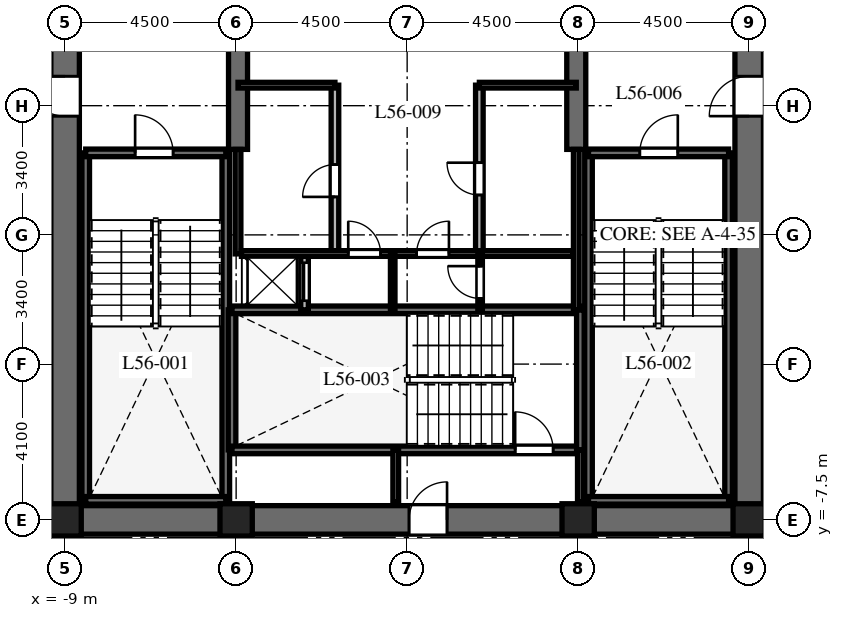
"""IFC4 building model, lengths in metres.
Left out: names, types, materials, properties, quantities, classifications, styles, units other than length and angle.
Written with IfcOpenShell. Run it as: python <this file> out.ifc"""

import sys

from ifc_helpers import new_model, si_unit, direction, frame, frame_2d, origin, origin_2d, place, context, subcontext, project, spatial, rectangle, extrude, element, fill, save


model = new_model("IFC4")
c1 = context("Model", 3, precision=1e-05, world=origin(), true_north=direction((0.0, 1.0)))
c2 = subcontext(c1, "Body", "Model", "MODEL_VIEW")
j1 = project(units=[si_unit("LENGTHUNIT", "METRE"), si_unit("PLANEANGLEUNIT", "RADIAN")], contexts=[c1])
p1 = place(None, origin())
s1 = spatial("IfcSite", under=j1, at=p1, CompositionType="ELEMENT")
p2 = place(p1, origin())
s2 = spatial("IfcBuilding", under=s1, at=p2, CompositionType="ELEMENT")
p3 = place(p2, frame((0.0, 0.0, 225.5)))
s3 = spatial("IfcBuildingStorey", under=s2, at=p3, CompositionType="ELEMENT", Elevation=225.5)
p4 = place(p3, frame((-9.375, -7.5, 0.0), z_axis=(0.0, 0.0, 1.0), x_axis=(1.0, 0.0, 0.0)))
e1 = element("IfcWall", 1, at=p4, inside=s3, PredefinedType="SHEAR", context=c2, shape_type="SweptSolid", body=[
    extrude(rectangle(XDim=18.75, YDim=0.75, at=frame_2d((9.375, 0.0))), origin(), (0.0, 0.0, 1.0), 3.8),
])
p5 = place(p4, frame((9.425, 0.0, 0.0)))
e2 = element("IfcOpeningElement", 2, at=p5, cuts=e1, PredefinedType="OPENING", context=c2, shape_type="SweptSolid", body=[
    extrude(rectangle(XDim=1.0, YDim=2.15, at=frame_2d((0.5, 1.075))), frame((0.0, 0.385, 0.0), z_axis=(0.0, -1.0, 0.0), x_axis=(1.0, 0.0, 0.0)), (0.0, 0.0, 1.0), 0.77),
])
p6 = place(p3, frame((-9.0, -7.125, 0.0), z_axis=(0.0, 0.0, 1.0), x_axis=(0.0, 1.0, 0.0)))
e3 = element("IfcWall", 3, at=p6, inside=s3, PredefinedType="SHEAR", context=c2, shape_type="SweptSolid", body=[
    extrude(rectangle(XDim=14.25, YDim=0.75, at=frame_2d((7.125, 0.0))), origin(), (0.0, 0.0, 1.0), 3.8),
])
p7 = place(p6, frame((10.25, 0.0, 0.0)))
e4 = element("IfcOpeningElement", 4, at=p7, cuts=e3, PredefinedType="OPENING", context=c2, shape_type="SweptSolid", body=[
    extrude(rectangle(XDim=1.05, YDim=2.15, at=frame_2d((0.525, 1.075))), frame((0.0, 0.385, 0.0), z_axis=(0.0, -1.0, 0.0), x_axis=(1.0, 0.0, 0.0)), (0.0, 0.0, 1.0), 0.77),
])
p8 = place(p3, frame((9.0, -7.125, 0.0), z_axis=(0.0, 0.0, 1.0), x_axis=(0.0, 1.0, 0.0)))
e5 = element("IfcWall", 5, at=p8, inside=s3, PredefinedType="SHEAR", context=c2, shape_type="SweptSolid", body=[
    extrude(rectangle(XDim=14.25, YDim=0.75, at=frame_2d((7.125, 0.0))), origin(), (0.0, 0.0, 1.0), 3.8),
])
p9 = place(p8, frame((10.25, 0.0, 0.0)))
e6 = element("IfcOpeningElement", 6, at=p9, cuts=e5, PredefinedType="OPENING", context=c2, shape_type="SweptSolid", body=[
    extrude(rectangle(XDim=1.05, YDim=2.15, at=frame_2d((0.525, 1.075))), frame((0.0, 0.385, 0.0), z_axis=(0.0, -1.0, 0.0), x_axis=(1.0, 0.0, 0.0)), (0.0, 0.0, 1.0), 0.77),
])
for number, where, z_axis, x_axis in (
    (7, (-4.45, 2.25, 0.0), (0.0, 0.0, 1.0), (0.0, 1.0, 0.0)),
    (8, (4.45, 2.25, 0.0), (0.0, 0.0, 1.0), (0.0, 1.0, 0.0)),
):
    element("IfcWall", number, at=place(p3, frame(where, z_axis=z_axis, x_axis=x_axis)), inside=s3, PredefinedType="SHEAR", context=c2, shape_type="SweptSolid", body=[
        extrude(rectangle(XDim=4.875, YDim=0.5, at=frame_2d((2.438, 0.0))), origin(), (0.0, 0.0, 1.0), 3.8),
    ])
for number, where, z_axis, x_axis in (
    (9, (-8.458, -6.985, 0.0), (0.0, 0.0, 1.0), (0.0, 1.0, 0.0)),
    (10, (-4.772, -6.985, 0.0), (0.0, 0.0, 1.0), (0.0, 1.0, 0.0)),
):
    element("IfcWall", number, at=place(p3, frame(where, z_axis=z_axis, x_axis=x_axis)), inside=s3, PredefinedType="SHEAR", context=c2, shape_type="SweptSolid", body=[
        extrude(rectangle(XDim=9.143, YDim=0.2, at=frame_2d((4.572, 0.0))), origin(), (0.0, 0.0, 1.0), 3.8),
    ])
p10 = place(p3, frame((-8.458, -6.985, 0.0), z_axis=(0.0, 0.0, 1.0), x_axis=(1.0, 0.0, 0.0)))
e11 = element("IfcWall", 11, at=p10, inside=s3, PredefinedType="SHEAR", context=c2, shape_type="SweptSolid", body=[
    extrude(rectangle(XDim=3.686, YDim=0.2, at=frame_2d((1.843, 0.0))), origin(), (0.0, 0.0, 1.0), 3.8),
])
p11 = place(p3, frame((-8.458, 2.158, 0.0), z_axis=(0.0, 0.0, 1.0), x_axis=(1.0, 0.0, 0.0)))
e12 = element("IfcWall", 12, at=p11, inside=s3, PredefinedType="SHEAR", context=c2, shape_type="SweptSolid", body=[
    extrude(rectangle(XDim=3.686, YDim=0.2, at=frame_2d((1.843, 0.0))), origin(), (0.0, 0.0, 1.0), 3.8),
])
p12 = place(p11, frame((1.3, 0.0, 0.0)))
e13 = element("IfcOpeningElement", 13, at=p12, cuts=e12, PredefinedType="OPENING", context=c2, shape_type="SweptSolid", body=[
    extrude(rectangle(XDim=1.0, YDim=2.15, at=frame_2d((0.5, 1.075))), frame((0.0, 0.11, 0.0), z_axis=(0.0, -1.0, 0.0), x_axis=(1.0, 0.0, 0.0)), (0.0, 0.0, 1.0), 0.22),
])
for number, where, z_axis, x_axis in (
    (14, (4.772, -6.985, 0.0), (0.0, 0.0, 1.0), (0.0, 1.0, 0.0)),
    (15, (8.458, -6.985, 0.0), (0.0, 0.0, 1.0), (0.0, 1.0, 0.0)),
):
    element("IfcWall", number, at=place(p3, frame(where, z_axis=z_axis, x_axis=x_axis)), inside=s3, PredefinedType="SHEAR", context=c2, shape_type="SweptSolid", body=[
        extrude(rectangle(XDim=9.143, YDim=0.2, at=frame_2d((4.572, 0.0))), origin(), (0.0, 0.0, 1.0), 3.8),
    ])
p13 = place(p3, frame((4.772, -6.985, 0.0), z_axis=(0.0, 0.0, 1.0), x_axis=(1.0, 0.0, 0.0)))
e16 = element("IfcWall", 16, at=p13, inside=s3, PredefinedType="SHEAR", context=c2, shape_type="SweptSolid", body=[
    extrude(rectangle(XDim=3.686, YDim=0.2, at=frame_2d((1.843, 0.0))), origin(), (0.0, 0.0, 1.0), 3.8),
])
p14 = place(p3, frame((4.772, 2.158, 0.0), z_axis=(0.0, 0.0, 1.0), x_axis=(1.0, 0.0, 0.0)))
e17 = element("IfcWall", 17, at=p14, inside=s3, PredefinedType="SHEAR", context=c2, shape_type="SweptSolid", body=[
    extrude(rectangle(XDim=3.686, YDim=0.2, at=frame_2d((1.843, 0.0))), origin(), (0.0, 0.0, 1.0), 3.8),
])
p15 = place(p14, frame((1.35, 0.0, 0.0)))
e18 = element("IfcOpeningElement", 18, at=p15, cuts=e17, PredefinedType="OPENING", context=c2, shape_type="SweptSolid", body=[
    extrude(rectangle(XDim=1.0, YDim=2.15, at=frame_2d((0.5, 1.075))), frame((0.0, 0.11, 0.0), z_axis=(0.0, -1.0, 0.0), x_axis=(1.0, 0.0, 0.0)), (0.0, 0.0, 1.0), 0.22),
])
p16 = place(p3, frame((-4.608, -5.658, 0.0), z_axis=(0.0, 0.0, 1.0), x_axis=(0.0, 1.0, 0.0)))
e19 = element("IfcWall", 19, at=p16, inside=s3, PredefinedType="SHEAR", context=c2, shape_type="SweptSolid", body=[
    extrude(rectangle(XDim=3.686, YDim=0.2, at=frame_2d((1.843, 0.0))), origin(), (0.0, 0.0, 1.0), 3.8),
])
p17 = place(p3, frame((-4.608, -5.658, 0.0), z_axis=(0.0, 0.0, 1.0), x_axis=(1.0, 0.0, 0.0)))
e20 = element("IfcWall", 20, at=p17, inside=s3, PredefinedType="SHEAR", context=c2, shape_type="SweptSolid", body=[
    extrude(rectangle(XDim=9.166, YDim=0.2, at=frame_2d((4.583, 0.0))), origin(), (0.0, 0.0, 1.0), 3.8),
])
p18 = place(p17, frame((7.45, 0.0, 0.0)))
e21 = element("IfcOpeningElement", 21, at=p18, cuts=e20, PredefinedType="OPENING", context=c2, shape_type="SweptSolid", body=[
    extrude(rectangle(XDim=1.0, YDim=2.15, at=frame_2d((0.5, 1.075))), frame((0.0, 0.11, 0.0), z_axis=(0.0, -1.0, 0.0), x_axis=(1.0, 0.0, 0.0)), (0.0, 0.0, 1.0), 0.22),
])
p19 = place(p3, frame((-4.608, -1.972, 0.0), z_axis=(0.0, 0.0, 1.0), x_axis=(1.0, 0.0, 0.0)))
e22 = element("IfcWall", 22, at=p19, inside=s3, PredefinedType="SHEAR", context=c2, shape_type="SweptSolid", body=[
    extrude(rectangle(XDim=9.166, YDim=0.2, at=frame_2d((4.583, 0.0))), origin(), (0.0, 0.0, 1.0), 3.8),
])
p20 = place(p3, frame((4.558, -5.658, 0.0), z_axis=(0.0, 0.0, 1.0), x_axis=(0.0, 1.0, 0.0)))
e23 = element("IfcWall", 23, at=p20, inside=s3, PredefinedType="SHEAR", context=c2, shape_type="SweptSolid", body=[
    extrude(rectangle(XDim=3.686, YDim=0.2, at=frame_2d((1.843, 0.0))), origin(), (0.0, 0.0, 1.0), 3.8),
])
for number, where, z_axis, x_axis in (
    (24, (-9.0, -7.5, 0.0), (0.0, 0.0, 1.0), (1.0, 0.0, 0.0)),
    (25, (-4.5, -7.5, 0.0), (0.0, 0.0, 1.0), (1.0, 0.0, 0.0)),
    (26, (4.5, -7.5, 0.0), (0.0, 0.0, 1.0), (1.0, 0.0, 0.0)),
    (27, (9.0, -7.5, 0.0), (0.0, 0.0, 1.0), (1.0, 0.0, 0.0)),
):
    element("IfcColumn", number, at=place(p3, frame(where, z_axis=z_axis, x_axis=x_axis)), inside=s3, PredefinedType="COLUMN", context=c2, shape_type="SweptSolid", body=[
        extrude(rectangle(XDim=0.85, YDim=0.85, at=origin_2d()), origin(), (0.0, 0.0, 1.0), 3.8),
    ])
for number, where, z_axis, x_axis in (
    (28, (-0.3, -7.02, 0.0), (0.0, 0.0, 1.0), (0.0, 1.0, 0.0)),
    (29, (4.558, -7.02, 0.0), (0.0, 0.0, 1.0), (0.0, 1.0, 0.0)),
):
    element("IfcWall", number, at=place(p3, frame(where, z_axis=z_axis, x_axis=x_axis)), inside=s3, PredefinedType="PARTITIONING", context=c2, shape_type="SweptSolid", body=[
        extrude(rectangle(XDim=1.362, YDim=0.15, at=frame_2d((0.681, 0.0))), origin(), (0.0, 0.0, 1.0), 3.5),
    ])
p21 = place(p3, frame((-2.7, -1.972, 0.0), z_axis=(0.0, 0.0, 1.0), x_axis=(0.0, 1.0, 0.0)))
e30 = element("IfcWall", 30, at=p21, inside=s3, PredefinedType="PARTITIONING", context=c2, shape_type="SweptSolid", body=[
    extrude(rectangle(XDim=1.472, YDim=0.2, at=frame_2d((0.736, 0.0))), origin(), (0.0, 0.0, 1.0), 3.5),
])
p22 = place(p21, frame((0.24, 0.0, 0.0)))
e31 = element("IfcOpeningElement", 31, at=p22, cuts=e30, PredefinedType="OPENING", context=c2, shape_type="SweptSolid", body=[
    extrude(rectangle(XDim=1.0, YDim=2.2, at=frame_2d((0.5, 1.1))), frame((0.0, 0.11, 0.0), z_axis=(0.0, -1.0, 0.0), x_axis=(1.0, 0.0, 0.0)), (0.0, 0.0, 1.0), 0.22),
])
p23 = place(p3, frame((-4.45, -0.5, 0.0), z_axis=(0.0, 0.0, 1.0), x_axis=(0.0, 1.0, 0.0)))
e32 = element("IfcWall", 32, at=p23, inside=s3, PredefinedType="PARTITIONING", context=c2, shape_type="SweptSolid", body=[
    extrude(rectangle(XDim=2.75, YDim=0.15, at=frame_2d((1.375, 0.0))), origin(), (0.0, 0.0, 1.0), 3.5),
])
p24 = place(p3, frame((4.45, -1.972, 0.0), z_axis=(0.0, 0.0, 1.0), x_axis=(0.0, 1.0, 0.0)))
e33 = element("IfcWall", 33, at=p24, inside=s3, PredefinedType="PARTITIONING", context=c2, shape_type="SweptSolid", body=[
    extrude(rectangle(XDim=4.222, YDim=0.15, at=frame_2d((2.111, 0.0))), origin(), (0.0, 0.0, 1.0), 3.5),
])
p25 = place(p3, frame((-1.9, -0.5, 0.0), z_axis=(0.0, 0.0, 1.0), x_axis=(0.0, 1.0, 0.0)))
e34 = element("IfcWall", 34, at=p25, inside=s3, PredefinedType="PARTITIONING", context=c2, shape_type="SweptSolid", body=[
    extrude(rectangle(XDim=4.44, YDim=0.2, at=frame_2d((2.22, 0.0))), origin(), (0.0, 0.0, 1.0), 3.5),
])
p26 = place(p25, frame((1.5, 0.0, 0.0)))
e35 = element("IfcOpeningElement", 35, at=p26, cuts=e34, PredefinedType="OPENING", context=c2, shape_type="SweptSolid", body=[
    extrude(rectangle(XDim=0.85, YDim=2.03, at=frame_2d((0.425, 1.015))), frame((0.0, 0.11, 0.0), z_axis=(0.0, -1.0, 0.0), x_axis=(1.0, 0.0, 0.0)), (0.0, 0.0, 1.0), 0.22),
])
p27 = place(p3, frame((-4.45, 3.94, 0.0), z_axis=(0.0, 0.0, 1.0), x_axis=(1.0, 0.0, 0.0)))
e36 = element("IfcWall", 36, at=p27, inside=s3, PredefinedType="PARTITIONING", context=c2, shape_type="SweptSolid", body=[
    extrude(rectangle(XDim=2.55, YDim=0.15, at=frame_2d((1.275, 0.0))), origin(), (0.0, 0.0, 1.0), 3.5),
])
p28 = place(p3, frame((1.9, -0.5, 0.0), z_axis=(0.0, 0.0, 1.0), x_axis=(0.0, 1.0, 0.0)))
e37 = element("IfcWall", 37, at=p28, inside=s3, PredefinedType="PARTITIONING", context=c2, shape_type="SweptSolid", body=[
    extrude(rectangle(XDim=4.44, YDim=0.2, at=frame_2d((2.22, 0.0))), origin(), (0.0, 0.0, 1.0), 3.5),
])
p29 = place(p28, frame((1.55, 0.0, 0.0)))
e38 = element("IfcOpeningElement", 38, at=p29, cuts=e37, PredefinedType="OPENING", context=c2, shape_type="SweptSolid", body=[
    extrude(rectangle(XDim=0.85, YDim=2.03, at=frame_2d((0.425, 1.015))), frame((0.0, 0.11, 0.0), z_axis=(0.0, -1.0, 0.0), x_axis=(1.0, 0.0, 0.0)), (0.0, 0.0, 1.0), 0.22),
])
p30 = place(p3, frame((1.9, 3.94, 0.0), z_axis=(0.0, 0.0, 1.0), x_axis=(1.0, 0.0, 0.0)))
e39 = element("IfcWall", 39, at=p30, inside=s3, PredefinedType="PARTITIONING", context=c2, shape_type="SweptSolid", body=[
    extrude(rectangle(XDim=2.55, YDim=0.15, at=frame_2d((1.275, 0.0))), origin(), (0.0, 0.0, 1.0), 3.5),
])
p31 = place(p3, frame((-4.36, -0.49, 0.0), z_axis=(0.0, 0.0, 1.0), x_axis=(1.0, 0.0, 0.0)))
e40 = element("IfcWall", 40, at=p31, inside=s3, PredefinedType="PARTITIONING", context=c2, shape_type="SweptSolid", body=[
    extrude(rectangle(XDim=8.72, YDim=0.15, at=frame_2d((4.36, 0.0))), origin(), (0.0, 0.0, 1.0), 3.5),
])
p32 = place(p31, frame((2.81, 0.0, 0.0)))
e41 = element("IfcOpeningElement", 41, at=p32, cuts=e40, PredefinedType="OPENING", context=c2, shape_type="SweptSolid", body=[
    extrude(rectangle(XDim=0.85, YDim=2.03, at=frame_2d((0.425, 1.015))), frame((0.0, 0.085, 0.0), z_axis=(0.0, -1.0, 0.0), x_axis=(1.0, 0.0, 0.0)), (0.0, 0.0, 1.0), 0.17),
])
p33 = place(p31, frame((4.61, 0.0, 0.0)))
e42 = element("IfcOpeningElement", 42, at=p33, cuts=e40, PredefinedType="OPENING", context=c2, shape_type="SweptSolid", body=[
    extrude(rectangle(XDim=0.85, YDim=2.03, at=frame_2d((0.425, 1.015))), frame((0.0, 0.085, 0.0), z_axis=(0.0, -1.0, 0.0), x_axis=(1.0, 0.0, 0.0)), (0.0, 0.0, 1.0), 0.17),
])
p34 = place(p3, frame((-0.38, -1.972, 0.0), z_axis=(0.0, 0.0, 1.0), x_axis=(0.0, 1.0, 0.0)))
e43 = element("IfcWall", 43, at=p34, inside=s3, PredefinedType="PARTITIONING", context=c2, shape_type="SweptSolid", body=[
    extrude(rectangle(XDim=1.472, YDim=0.12, at=frame_2d((0.736, 0.0))), origin(), (0.0, 0.0, 1.0), 3.5),
])
p35 = place(p3, frame((1.92, -1.972, 0.0), z_axis=(0.0, 0.0, 1.0), x_axis=(0.0, 1.0, 0.0)))
e44 = element("IfcWall", 44, at=p35, inside=s3, PredefinedType="PARTITIONING", context=c2, shape_type="SweptSolid", body=[
    extrude(rectangle(XDim=1.472, YDim=0.12, at=frame_2d((0.736, 0.0))), origin(), (0.0, 0.0, 1.0), 3.5),
])
p36 = place(p35, frame((0.3, 0.0, 0.0)))
e45 = element("IfcOpeningElement", 45, at=p36, cuts=e44, PredefinedType="OPENING", context=c2, shape_type="SweptSolid", body=[
    extrude(rectangle(XDim=0.85, YDim=2.03, at=frame_2d((0.425, 1.015))), frame((0.0, 0.07, 0.0), z_axis=(0.0, -1.0, 0.0), x_axis=(1.0, 0.0, 0.0)), (0.0, 0.0, 1.0), 0.14),
])
p37 = place(p12, origin())
e46 = element("IfcDoor", 46, at=p37, inside=s3, OperationType="SINGLE_SWING_LEFT", PredefinedType="DOOR", context=c2, shape_type="SweptSolid", body=[
    extrude(rectangle(XDim=1.0, YDim=2.15, at=frame_2d((0.5, 1.075))), frame((0.0, 0.025, 0.0), z_axis=(0.0, -1.0, 0.0), x_axis=(1.0, 0.0, 0.0)), (0.0, 0.0, 1.0), 0.05),
])
fill(e13, e46)
p38 = place(p15, origin())
e47 = element("IfcDoor", 47, at=p38, inside=s3, OperationType="SINGLE_SWING_RIGHT", PredefinedType="DOOR", context=c2, shape_type="SweptSolid", body=[
    extrude(rectangle(XDim=1.0, YDim=2.15, at=frame_2d((0.5, 1.075))), frame((0.0, 0.025, 0.0), z_axis=(0.0, -1.0, 0.0), x_axis=(1.0, 0.0, 0.0)), (0.0, 0.0, 1.0), 0.05),
])
fill(e18, e47)
p39 = place(p18, origin())
e48 = element("IfcDoor", 48, at=p39, inside=s3, OperationType="SINGLE_SWING_LEFT", PredefinedType="DOOR", context=c2, shape_type="SweptSolid", body=[
    extrude(rectangle(XDim=1.0, YDim=2.15, at=frame_2d((0.5, 1.075))), frame((0.0, 0.025, 0.0), z_axis=(0.0, -1.0, 0.0), x_axis=(1.0, 0.0, 0.0)), (0.0, 0.0, 1.0), 0.05),
])
fill(e21, e48)
p40 = place(p5, origin())
e49 = element("IfcDoor", 49, at=p40, inside=s3, OperationType="SINGLE_SWING_RIGHT", PredefinedType="DOOR", context=c2, shape_type="SweptSolid", body=[
    extrude(rectangle(XDim=1.0, YDim=2.15, at=frame_2d((0.5, 1.075))), frame((0.0, 0.025, 0.0), z_axis=(0.0, -1.0, 0.0), x_axis=(1.0, 0.0, 0.0)), (0.0, 0.0, 1.0), 0.05),
])
fill(e2, e49)
p41 = place(p7, origin())
e50 = element("IfcDoor", 50, at=p41, inside=s3, OperationType="SINGLE_SWING_RIGHT", PredefinedType="DOOR", context=c2, shape_type="SweptSolid", body=[
    extrude(rectangle(XDim=1.05, YDim=2.15, at=frame_2d((0.525, 1.075))), frame((0.0, 0.025, 0.0), z_axis=(0.0, -1.0, 0.0), x_axis=(1.0, 0.0, 0.0)), (0.0, 0.0, 1.0), 0.05),
])
fill(e4, e50)
p42 = place(p9, origin())
e51 = element("IfcDoor", 51, at=p42, inside=s3, OperationType="SINGLE_SWING_LEFT", PredefinedType="DOOR", context=c2, shape_type="SweptSolid", body=[
    extrude(rectangle(XDim=1.05, YDim=2.15, at=frame_2d((0.525, 1.075))), frame((0.0, 0.025, 0.0), z_axis=(0.0, -1.0, 0.0), x_axis=(1.0, 0.0, 0.0)), (0.0, 0.0, 1.0), 0.05),
])
fill(e6, e51)
p43 = place(p22, origin())
e52 = element("IfcDoor", 52, at=p43, inside=s3, OperationType="SLIDING_TO_LEFT", PredefinedType="DOOR", context=c2, shape_type="SweptSolid", body=[
    extrude(rectangle(XDim=1.0, YDim=2.2, at=frame_2d((0.5, 1.1))), frame((0.0, 0.025, 0.0), z_axis=(0.0, -1.0, 0.0), x_axis=(1.0, 0.0, 0.0)), (0.0, 0.0, 1.0), 0.05),
])
fill(e31, e52)
p44 = place(p26, origin())
e53 = element("IfcDoor", 53, at=p44, inside=s3, OperationType="SINGLE_SWING_LEFT", PredefinedType="DOOR", context=c2, shape_type="SweptSolid", body=[
    extrude(rectangle(XDim=0.85, YDim=2.03, at=frame_2d((0.425, 1.015))), frame((0.0, 0.025, 0.0), z_axis=(0.0, -1.0, 0.0), x_axis=(1.0, 0.0, 0.0)), (0.0, 0.0, 1.0), 0.05),
])
fill(e35, e53)
p45 = place(p29, origin())
e54 = element("IfcDoor", 54, at=p45, inside=s3, OperationType="SINGLE_SWING_RIGHT", PredefinedType="DOOR", context=c2, shape_type="SweptSolid", body=[
    extrude(rectangle(XDim=0.85, YDim=2.03, at=frame_2d((0.425, 1.015))), frame((0.0, 0.025, 0.0), z_axis=(0.0, -1.0, 0.0), x_axis=(1.0, 0.0, 0.0)), (0.0, 0.0, 1.0), 0.05),
])
fill(e38, e54)
p46 = place(p32, origin())
e55 = element("IfcDoor", 55, at=p46, inside=s3, OperationType="SINGLE_SWING_LEFT", PredefinedType="DOOR", context=c2, shape_type="SweptSolid", body=[
    extrude(rectangle(XDim=0.85, YDim=2.03, at=frame_2d((0.425, 1.015))), frame((0.0, 0.025, 0.0), z_axis=(0.0, -1.0, 0.0), x_axis=(1.0, 0.0, 0.0)), (0.0, 0.0, 1.0), 0.05),
])
fill(e41, e55)
p47 = place(p33, origin())
e56 = element("IfcDoor", 56, at=p47, inside=s3, OperationType="SINGLE_SWING_RIGHT", PredefinedType="DOOR", context=c2, shape_type="SweptSolid", body=[
    extrude(rectangle(XDim=0.85, YDim=2.03, at=frame_2d((0.425, 1.015))), frame((0.0, 0.025, 0.0), z_axis=(0.0, -1.0, 0.0), x_axis=(1.0, 0.0, 0.0)), (0.0, 0.0, 1.0), 0.05),
])
fill(e42, e56)
p48 = place(p36, origin())
e57 = element("IfcDoor", 57, at=p48, inside=s3, OperationType="SINGLE_SWING_RIGHT", PredefinedType="DOOR", context=c2, shape_type="SweptSolid", body=[
    extrude(rectangle(XDim=0.85, YDim=2.03, at=frame_2d((0.425, 1.015))), frame((0.0, 0.025, 0.0), z_axis=(0.0, -1.0, 0.0), x_axis=(1.0, 0.0, 0.0)), (0.0, 0.0, 1.0), 0.05),
])
fill(e45, e57)
save(model, sys.argv[1])
